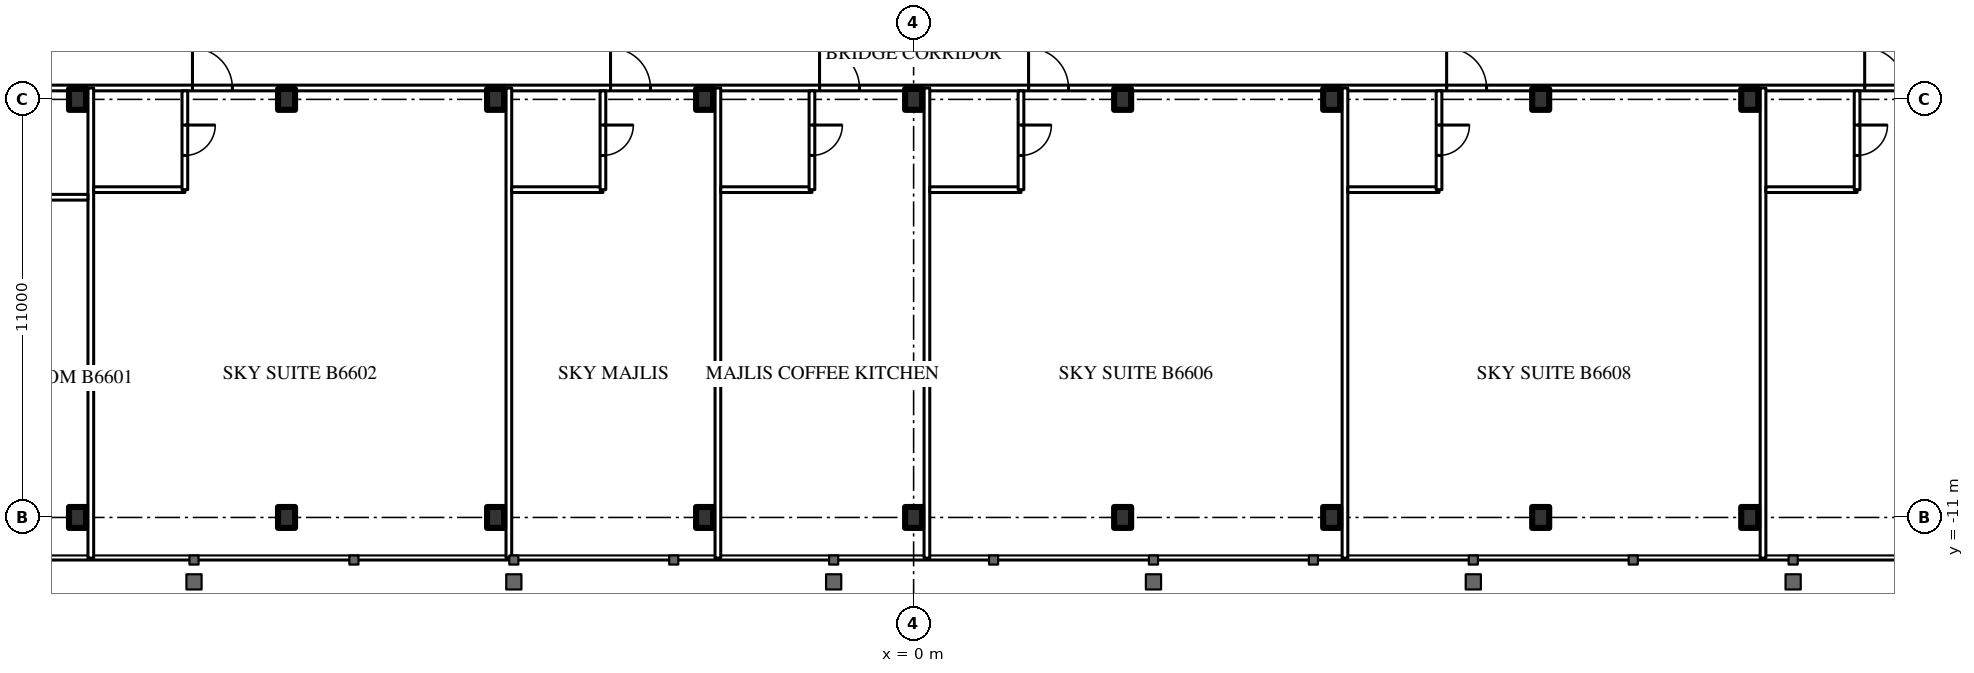
"""IFC4 building model, lengths in metres.
Left out: names, types, materials, properties, quantities, classifications, styles, units other than length and angle.
Written with IfcOpenShell. Run it as: python <this file> out.ifc"""

import sys

from ifc_helpers import new_model, si_unit, direction, frame, frame_2d, origin, origin_2d, place, context, subcontext, project, spatial, rectangle, i_section, extrude, element, fill, save


model = new_model("IFC4")
c1 = context("Model", 3, precision=1e-05, world=origin(), true_north=direction((0.0, 1.0)))
c2 = subcontext(c1, "Body", "Model", "MODEL_VIEW")
j1 = project(units=[si_unit("LENGTHUNIT", "METRE"), si_unit("PLANEANGLEUNIT", "RADIAN")], contexts=[c1])
p1 = place(None, origin())
s1 = spatial("IfcSite", under=j1, at=p1, CompositionType="ELEMENT")
p2 = place(p1, origin())
s2 = spatial("IfcBuilding", under=s1, at=p2, CompositionType="ELEMENT")
p3 = place(p2, frame((0.0, 0.0, 247.7)))
s3 = spatial("IfcBuildingStorey", under=s2, at=p3, CompositionType="ELEMENT", Elevation=247.7)
for number, where, z_axis, x_axis in (
    (1, (-22.0, -11.0, 0.0), (0.0, 0.0, 1.0), (1.0, 0.0, 0.0)),
    (2, (-16.5, -11.0, 0.0), (0.0, 0.0, 1.0), (1.0, 0.0, 0.0)),
    (3, (-11.0, -11.0, 0.0), (0.0, 0.0, 1.0), (1.0, 0.0, 0.0)),
    (4, (-5.5, -11.0, 0.0), (0.0, 0.0, 1.0), (1.0, 0.0, 0.0)),
    (5, (0.0, -11.0, 0.0), (0.0, 0.0, 1.0), (1.0, 0.0, 0.0)),
    (6, (5.5, -11.0, 0.0), (0.0, 0.0, 1.0), (1.0, 0.0, 0.0)),
    (7, (11.0, -11.0, 0.0), (0.0, 0.0, 1.0), (1.0, 0.0, 0.0)),
    (8, (16.5, -11.0, 0.0), (0.0, 0.0, 1.0), (1.0, 0.0, 0.0)),
    (9, (22.0, -11.0, 0.0), (0.0, 0.0, 1.0), (1.0, 0.0, 0.0)),
    (10, (-22.0, 0.0, 0.0), (0.0, 0.0, 1.0), (1.0, 0.0, 0.0)),
    (11, (-16.5, 0.0, 0.0), (0.0, 0.0, 1.0), (1.0, 0.0, 0.0)),
    (12, (-11.0, 0.0, 0.0), (0.0, 0.0, 1.0), (1.0, 0.0, 0.0)),
    (13, (-5.5, 0.0, 0.0), (0.0, 0.0, 1.0), (1.0, 0.0, 0.0)),
    (14, (0.0, 0.0, 0.0), (0.0, 0.0, 1.0), (1.0, 0.0, 0.0)),
    (15, (5.5, 0.0, 0.0), (0.0, 0.0, 1.0), (1.0, 0.0, 0.0)),
    (16, (11.0, 0.0, 0.0), (0.0, 0.0, 1.0), (1.0, 0.0, 0.0)),
    (17, (16.5, 0.0, 0.0), (0.0, 0.0, 1.0), (1.0, 0.0, 0.0)),
    (18, (22.0, 0.0, 0.0), (0.0, 0.0, 1.0), (1.0, 0.0, 0.0)),
):
    element("IfcColumn", number, at=place(p3, frame(where, z_axis=z_axis, x_axis=x_axis)), inside=s3, PredefinedType="COLUMN", context=c2, shape_type="SweptSolid", body=[
        extrude(i_section(OverallWidth=0.448, OverallDepth=0.55, WebThickness=0.072, FlangeThickness=0.115, FilletRadius=0.02, at=origin_2d()), origin(), (0.0, 0.0, 1.0), 4.2),
    ])
p4 = place(p3, frame((-27.5, 0.3, 0.0), z_axis=(0.0, 0.0, 1.0), x_axis=(1.0, 0.0, 0.0)))
e19 = element("IfcWall", 19, at=p4, inside=s3, PredefinedType="PARTITIONING", context=c2, shape_type="SweptSolid", body=[
    extrude(rectangle(XDim=55.0, YDim=0.15, at=frame_2d((27.5, 0.0))), origin(), (0.0, 0.0, 1.0), 3.0),
])
p5 = place(p4, frame((1.575, 0.0, 0.0)))
e20 = element("IfcOpeningElement", 20, at=p5, cuts=e19, PredefinedType="OPENING", context=c2, shape_type="SweptSolid", body=[
    extrude(rectangle(XDim=1.0, YDim=2.2, at=frame_2d((0.5, 1.1))), frame((0.0, 0.085, 0.0), z_axis=(0.0, -1.0, 0.0), x_axis=(1.0, 0.0, 0.0)), (0.0, 0.0, 1.0), 0.17),
])
p6 = place(p4, frame((8.525, 0.0, 0.0)))
e21 = element("IfcOpeningElement", 21, at=p6, cuts=e19, PredefinedType="OPENING", context=c2, shape_type="SweptSolid", body=[
    extrude(rectangle(XDim=1.05, YDim=2.4, at=frame_2d((0.525, 1.2))), frame((0.0, 0.085, 0.0), z_axis=(0.0, -1.0, 0.0), x_axis=(1.0, 0.0, 0.0)), (0.0, 0.0, 1.0), 0.17),
])
p7 = place(p4, frame((19.525, 0.0, 0.0)))
e22 = element("IfcOpeningElement", 22, at=p7, cuts=e19, PredefinedType="OPENING", context=c2, shape_type="SweptSolid", body=[
    extrude(rectangle(XDim=1.05, YDim=2.4, at=frame_2d((0.525, 1.2))), frame((0.0, 0.085, 0.0), z_axis=(0.0, -1.0, 0.0), x_axis=(1.0, 0.0, 0.0)), (0.0, 0.0, 1.0), 0.17),
])
p8 = place(p4, frame((25.025, 0.0, 0.0)))
e23 = element("IfcOpeningElement", 23, at=p8, cuts=e19, PredefinedType="OPENING", context=c2, shape_type="SweptSolid", body=[
    extrude(rectangle(XDim=1.05, YDim=2.4, at=frame_2d((0.525, 1.2))), frame((0.0, 0.085, 0.0), z_axis=(0.0, -1.0, 0.0), x_axis=(1.0, 0.0, 0.0)), (0.0, 0.0, 1.0), 0.17),
])
p9 = place(p4, frame((30.525, 0.0, 0.0)))
e24 = element("IfcOpeningElement", 24, at=p9, cuts=e19, PredefinedType="OPENING", context=c2, shape_type="SweptSolid", body=[
    extrude(rectangle(XDim=1.05, YDim=2.4, at=frame_2d((0.525, 1.2))), frame((0.0, 0.085, 0.0), z_axis=(0.0, -1.0, 0.0), x_axis=(1.0, 0.0, 0.0)), (0.0, 0.0, 1.0), 0.17),
])
p10 = place(p4, frame((41.525, 0.0, 0.0)))
e25 = element("IfcOpeningElement", 25, at=p10, cuts=e19, PredefinedType="OPENING", context=c2, shape_type="SweptSolid", body=[
    extrude(rectangle(XDim=1.05, YDim=2.4, at=frame_2d((0.525, 1.2))), frame((0.0, 0.085, 0.0), z_axis=(0.0, -1.0, 0.0), x_axis=(1.0, 0.0, 0.0)), (0.0, 0.0, 1.0), 0.17),
])
p11 = place(p4, frame((52.525, 0.0, 0.0)))
e26 = element("IfcOpeningElement", 26, at=p11, cuts=e19, PredefinedType="OPENING", context=c2, shape_type="SweptSolid", body=[
    extrude(rectangle(XDim=1.05, YDim=2.4, at=frame_2d((0.525, 1.2))), frame((0.0, 0.085, 0.0), z_axis=(0.0, -1.0, 0.0), x_axis=(1.0, 0.0, 0.0)), (0.0, 0.0, 1.0), 0.17),
])
for number, where, z_axis, x_axis in (
    (27, (-21.65, -12.07, 0.0), (0.0, 0.0, 1.0), (0.0, 1.0, 0.0)),
    (28, (-10.65, -12.07, 0.0), (0.0, 0.0, 1.0), (0.0, 1.0, 0.0)),
    (29, (-5.15, -12.07, 0.0), (0.0, 0.0, 1.0), (0.0, 1.0, 0.0)),
    (30, (0.35, -12.07, 0.0), (0.0, 0.0, 1.0), (0.0, 1.0, 0.0)),
    (31, (11.35, -12.07, 0.0), (0.0, 0.0, 1.0), (0.0, 1.0, 0.0)),
    (32, (22.35, -12.07, 0.0), (0.0, 0.0, 1.0), (0.0, 1.0, 0.0)),
):
    element("IfcWall", number, at=place(p3, frame(where, z_axis=z_axis, x_axis=x_axis)), inside=s3, PredefinedType="PARTITIONING", context=c2, shape_type="SweptSolid", body=[
        extrude(rectangle(XDim=12.37, YDim=0.15, at=frame_2d((6.185, 0.0))), origin(), (0.0, 0.0, 1.0), 4.0),
    ])
p12 = place(p3, frame((-24.525, -2.575, 0.0), z_axis=(0.0, 0.0, 1.0), x_axis=(1.0, 0.0, 0.0)))
e33 = element("IfcWall", 33, at=p12, inside=s3, PredefinedType="PARTITIONING", context=c2, shape_type="SweptSolid", body=[
    extrude(rectangle(XDim=2.8, YDim=0.15, at=frame_2d((1.4, 0.0))), origin(), (0.0, 0.0, 1.0), 4.0),
])
p13 = place(p3, frame((-21.575, -2.375, 0.0), z_axis=(0.0, 0.0, 1.0), x_axis=(1.0, 0.0, 0.0)))
e34 = element("IfcWall", 34, at=p13, inside=s3, PredefinedType="PARTITIONING", context=c2, shape_type="SweptSolid", body=[
    extrude(rectangle(XDim=2.4, YDim=0.15, at=frame_2d((1.2, 0.0))), origin(), (0.0, 0.0, 1.0), 4.0),
])
p14 = place(p3, frame((-19.175, -2.375, 0.0), z_axis=(0.0, 0.0, 1.0), x_axis=(0.0, 1.0, 0.0)))
e35 = element("IfcWall", 35, at=p14, inside=s3, PredefinedType="PARTITIONING", context=c2, shape_type="SweptSolid", body=[
    extrude(rectangle(XDim=2.6, YDim=0.15, at=frame_2d((1.3, 0.0))), origin(), (0.0, 0.0, 1.0), 4.0),
])
p15 = place(p14, frame((0.9, 0.0, 0.0)))
e36 = element("IfcOpeningElement", 36, at=p15, cuts=e35, PredefinedType="OPENING", context=c2, shape_type="SweptSolid", body=[
    extrude(rectangle(XDim=0.8, YDim=2.2, at=frame_2d((0.4, 1.1))), frame((0.0, 0.085, 0.0), z_axis=(0.0, -1.0, 0.0), x_axis=(1.0, 0.0, 0.0)), (0.0, 0.0, 1.0), 0.17),
])
p16 = place(p3, frame((-10.575, -2.375, 0.0), z_axis=(0.0, 0.0, 1.0), x_axis=(1.0, 0.0, 0.0)))
e37 = element("IfcWall", 37, at=p16, inside=s3, PredefinedType="PARTITIONING", context=c2, shape_type="SweptSolid", body=[
    extrude(rectangle(XDim=2.4, YDim=0.15, at=frame_2d((1.2, 0.0))), origin(), (0.0, 0.0, 1.0), 4.0),
])
p17 = place(p3, frame((-8.175, -2.375, 0.0), z_axis=(0.0, 0.0, 1.0), x_axis=(0.0, 1.0, 0.0)))
e38 = element("IfcWall", 38, at=p17, inside=s3, PredefinedType="PARTITIONING", context=c2, shape_type="SweptSolid", body=[
    extrude(rectangle(XDim=2.6, YDim=0.15, at=frame_2d((1.3, 0.0))), origin(), (0.0, 0.0, 1.0), 4.0),
])
p18 = place(p17, frame((0.9, 0.0, 0.0)))
e39 = element("IfcOpeningElement", 39, at=p18, cuts=e38, PredefinedType="OPENING", context=c2, shape_type="SweptSolid", body=[
    extrude(rectangle(XDim=0.8, YDim=2.2, at=frame_2d((0.4, 1.1))), frame((0.0, 0.085, 0.0), z_axis=(0.0, -1.0, 0.0), x_axis=(1.0, 0.0, 0.0)), (0.0, 0.0, 1.0), 0.17),
])
p19 = place(p3, frame((-5.075, -2.375, 0.0), z_axis=(0.0, 0.0, 1.0), x_axis=(1.0, 0.0, 0.0)))
e40 = element("IfcWall", 40, at=p19, inside=s3, PredefinedType="PARTITIONING", context=c2, shape_type="SweptSolid", body=[
    extrude(rectangle(XDim=2.4, YDim=0.15, at=frame_2d((1.2, 0.0))), origin(), (0.0, 0.0, 1.0), 4.0),
])
p20 = place(p3, frame((-2.675, -2.375, 0.0), z_axis=(0.0, 0.0, 1.0), x_axis=(0.0, 1.0, 0.0)))
e41 = element("IfcWall", 41, at=p20, inside=s3, PredefinedType="PARTITIONING", context=c2, shape_type="SweptSolid", body=[
    extrude(rectangle(XDim=2.6, YDim=0.15, at=frame_2d((1.3, 0.0))), origin(), (0.0, 0.0, 1.0), 4.0),
])
p21 = place(p20, frame((0.9, 0.0, 0.0)))
e42 = element("IfcOpeningElement", 42, at=p21, cuts=e41, PredefinedType="OPENING", context=c2, shape_type="SweptSolid", body=[
    extrude(rectangle(XDim=0.8, YDim=2.2, at=frame_2d((0.4, 1.1))), frame((0.0, 0.085, 0.0), z_axis=(0.0, -1.0, 0.0), x_axis=(1.0, 0.0, 0.0)), (0.0, 0.0, 1.0), 0.17),
])
p22 = place(p3, frame((0.425, -2.375, 0.0), z_axis=(0.0, 0.0, 1.0), x_axis=(1.0, 0.0, 0.0)))
e43 = element("IfcWall", 43, at=p22, inside=s3, PredefinedType="PARTITIONING", context=c2, shape_type="SweptSolid", body=[
    extrude(rectangle(XDim=2.4, YDim=0.15, at=frame_2d((1.2, 0.0))), origin(), (0.0, 0.0, 1.0), 4.0),
])
p23 = place(p3, frame((2.825, -2.375, 0.0), z_axis=(0.0, 0.0, 1.0), x_axis=(0.0, 1.0, 0.0)))
e44 = element("IfcWall", 44, at=p23, inside=s3, PredefinedType="PARTITIONING", context=c2, shape_type="SweptSolid", body=[
    extrude(rectangle(XDim=2.6, YDim=0.15, at=frame_2d((1.3, 0.0))), origin(), (0.0, 0.0, 1.0), 4.0),
])
p24 = place(p23, frame((0.9, 0.0, 0.0)))
e45 = element("IfcOpeningElement", 45, at=p24, cuts=e44, PredefinedType="OPENING", context=c2, shape_type="SweptSolid", body=[
    extrude(rectangle(XDim=0.8, YDim=2.2, at=frame_2d((0.4, 1.1))), frame((0.0, 0.085, 0.0), z_axis=(0.0, -1.0, 0.0), x_axis=(1.0, 0.0, 0.0)), (0.0, 0.0, 1.0), 0.17),
])
p25 = place(p3, frame((11.425, -2.375, 0.0), z_axis=(0.0, 0.0, 1.0), x_axis=(1.0, 0.0, 0.0)))
e46 = element("IfcWall", 46, at=p25, inside=s3, PredefinedType="PARTITIONING", context=c2, shape_type="SweptSolid", body=[
    extrude(rectangle(XDim=2.4, YDim=0.15, at=frame_2d((1.2, 0.0))), origin(), (0.0, 0.0, 1.0), 4.0),
])
p26 = place(p3, frame((13.825, -2.375, 0.0), z_axis=(0.0, 0.0, 1.0), x_axis=(0.0, 1.0, 0.0)))
e47 = element("IfcWall", 47, at=p26, inside=s3, PredefinedType="PARTITIONING", context=c2, shape_type="SweptSolid", body=[
    extrude(rectangle(XDim=2.6, YDim=0.15, at=frame_2d((1.3, 0.0))), origin(), (0.0, 0.0, 1.0), 4.0),
])
p27 = place(p26, frame((0.9, 0.0, 0.0)))
e48 = element("IfcOpeningElement", 48, at=p27, cuts=e47, PredefinedType="OPENING", context=c2, shape_type="SweptSolid", body=[
    extrude(rectangle(XDim=0.8, YDim=2.2, at=frame_2d((0.4, 1.1))), frame((0.0, 0.085, 0.0), z_axis=(0.0, -1.0, 0.0), x_axis=(1.0, 0.0, 0.0)), (0.0, 0.0, 1.0), 0.17),
])
p28 = place(p3, frame((22.425, -2.375, 0.0), z_axis=(0.0, 0.0, 1.0), x_axis=(1.0, 0.0, 0.0)))
e49 = element("IfcWall", 49, at=p28, inside=s3, PredefinedType="PARTITIONING", context=c2, shape_type="SweptSolid", body=[
    extrude(rectangle(XDim=2.4, YDim=0.15, at=frame_2d((1.2, 0.0))), origin(), (0.0, 0.0, 1.0), 4.0),
])
p29 = place(p3, frame((24.825, -2.375, 0.0), z_axis=(0.0, 0.0, 1.0), x_axis=(0.0, 1.0, 0.0)))
e50 = element("IfcWall", 50, at=p29, inside=s3, PredefinedType="PARTITIONING", context=c2, shape_type="SweptSolid", body=[
    extrude(rectangle(XDim=2.6, YDim=0.15, at=frame_2d((1.3, 0.0))), origin(), (0.0, 0.0, 1.0), 4.0),
])
p30 = place(p29, frame((0.9, 0.0, 0.0)))
e51 = element("IfcOpeningElement", 51, at=p30, cuts=e50, PredefinedType="OPENING", context=c2, shape_type="SweptSolid", body=[
    extrude(rectangle(XDim=0.8, YDim=2.2, at=frame_2d((0.4, 1.1))), frame((0.0, 0.085, 0.0), z_axis=(0.0, -1.0, 0.0), x_axis=(1.0, 0.0, 0.0)), (0.0, 0.0, 1.0), 0.17),
])
p31 = place(p15, origin())
e52 = element("IfcDoor", 52, at=p31, inside=s3, OperationType="SINGLE_SWING_RIGHT", PredefinedType="DOOR", context=c2, shape_type="SweptSolid", body=[
    extrude(rectangle(XDim=0.8, YDim=2.2, at=frame_2d((0.4, 1.1))), frame((0.0, 0.025, 0.0), z_axis=(0.0, -1.0, 0.0), x_axis=(1.0, 0.0, 0.0)), (0.0, 0.0, 1.0), 0.05),
])
fill(e36, e52)
p32 = place(p6, origin())
e53 = element("IfcDoor", 53, at=p32, inside=s3, OperationType="SINGLE_SWING_LEFT", PredefinedType="DOOR", context=c2, shape_type="SweptSolid", body=[
    extrude(rectangle(XDim=1.05, YDim=2.4, at=frame_2d((0.525, 1.2))), frame((0.0, 0.025, 0.0), z_axis=(0.0, -1.0, 0.0), x_axis=(1.0, 0.0, 0.0)), (0.0, 0.0, 1.0), 0.05),
])
fill(e21, e53)
p33 = place(p18, origin())
e54 = element("IfcDoor", 54, at=p33, inside=s3, OperationType="SINGLE_SWING_RIGHT", PredefinedType="DOOR", context=c2, shape_type="SweptSolid", body=[
    extrude(rectangle(XDim=0.8, YDim=2.2, at=frame_2d((0.4, 1.1))), frame((0.0, 0.025, 0.0), z_axis=(0.0, -1.0, 0.0), x_axis=(1.0, 0.0, 0.0)), (0.0, 0.0, 1.0), 0.05),
])
fill(e39, e54)
p34 = place(p7, origin())
e55 = element("IfcDoor", 55, at=p34, inside=s3, OperationType="SINGLE_SWING_LEFT", PredefinedType="DOOR", context=c2, shape_type="SweptSolid", body=[
    extrude(rectangle(XDim=1.05, YDim=2.4, at=frame_2d((0.525, 1.2))), frame((0.0, 0.025, 0.0), z_axis=(0.0, -1.0, 0.0), x_axis=(1.0, 0.0, 0.0)), (0.0, 0.0, 1.0), 0.05),
])
fill(e22, e55)
p35 = place(p21, origin())
e56 = element("IfcDoor", 56, at=p35, inside=s3, OperationType="SINGLE_SWING_RIGHT", PredefinedType="DOOR", context=c2, shape_type="SweptSolid", body=[
    extrude(rectangle(XDim=0.8, YDim=2.2, at=frame_2d((0.4, 1.1))), frame((0.0, 0.025, 0.0), z_axis=(0.0, -1.0, 0.0), x_axis=(1.0, 0.0, 0.0)), (0.0, 0.0, 1.0), 0.05),
])
fill(e42, e56)
p36 = place(p8, origin())
e57 = element("IfcDoor", 57, at=p36, inside=s3, OperationType="SINGLE_SWING_LEFT", PredefinedType="DOOR", context=c2, shape_type="SweptSolid", body=[
    extrude(rectangle(XDim=1.05, YDim=2.4, at=frame_2d((0.525, 1.2))), frame((0.0, 0.025, 0.0), z_axis=(0.0, -1.0, 0.0), x_axis=(1.0, 0.0, 0.0)), (0.0, 0.0, 1.0), 0.05),
])
fill(e23, e57)
p37 = place(p24, origin())
e58 = element("IfcDoor", 58, at=p37, inside=s3, OperationType="SINGLE_SWING_RIGHT", PredefinedType="DOOR", context=c2, shape_type="SweptSolid", body=[
    extrude(rectangle(XDim=0.8, YDim=2.2, at=frame_2d((0.4, 1.1))), frame((0.0, 0.025, 0.0), z_axis=(0.0, -1.0, 0.0), x_axis=(1.0, 0.0, 0.0)), (0.0, 0.0, 1.0), 0.05),
])
fill(e45, e58)
p38 = place(p9, origin())
e59 = element("IfcDoor", 59, at=p38, inside=s3, OperationType="SINGLE_SWING_LEFT", PredefinedType="DOOR", context=c2, shape_type="SweptSolid", body=[
    extrude(rectangle(XDim=1.05, YDim=2.4, at=frame_2d((0.525, 1.2))), frame((0.0, 0.025, 0.0), z_axis=(0.0, -1.0, 0.0), x_axis=(1.0, 0.0, 0.0)), (0.0, 0.0, 1.0), 0.05),
])
fill(e24, e59)
p39 = place(p27, origin())
e60 = element("IfcDoor", 60, at=p39, inside=s3, OperationType="SINGLE_SWING_RIGHT", PredefinedType="DOOR", context=c2, shape_type="SweptSolid", body=[
    extrude(rectangle(XDim=0.8, YDim=2.2, at=frame_2d((0.4, 1.1))), frame((0.0, 0.025, 0.0), z_axis=(0.0, -1.0, 0.0), x_axis=(1.0, 0.0, 0.0)), (0.0, 0.0, 1.0), 0.05),
])
fill(e48, e60)
p40 = place(p10, origin())
e61 = element("IfcDoor", 61, at=p40, inside=s3, OperationType="SINGLE_SWING_LEFT", PredefinedType="DOOR", context=c2, shape_type="SweptSolid", body=[
    extrude(rectangle(XDim=1.05, YDim=2.4, at=frame_2d((0.525, 1.2))), frame((0.0, 0.025, 0.0), z_axis=(0.0, -1.0, 0.0), x_axis=(1.0, 0.0, 0.0)), (0.0, 0.0, 1.0), 0.05),
])
fill(e25, e61)
p41 = place(p30, origin())
e62 = element("IfcDoor", 62, at=p41, inside=s3, OperationType="SINGLE_SWING_RIGHT", PredefinedType="DOOR", context=c2, shape_type="SweptSolid", body=[
    extrude(rectangle(XDim=0.8, YDim=2.2, at=frame_2d((0.4, 1.1))), frame((0.0, 0.025, 0.0), z_axis=(0.0, -1.0, 0.0), x_axis=(1.0, 0.0, 0.0)), (0.0, 0.0, 1.0), 0.05),
])
fill(e51, e62)
p42 = place(p11, origin())
e63 = element("IfcDoor", 63, at=p42, inside=s3, OperationType="SINGLE_SWING_LEFT", PredefinedType="DOOR", context=c2, shape_type="SweptSolid", body=[
    extrude(rectangle(XDim=1.05, YDim=2.4, at=frame_2d((0.525, 1.2))), frame((0.0, 0.025, 0.0), z_axis=(0.0, -1.0, 0.0), x_axis=(1.0, 0.0, 0.0)), (0.0, 0.0, 1.0), 0.05),
])
fill(e26, e63)
save(model, sys.argv[1])
